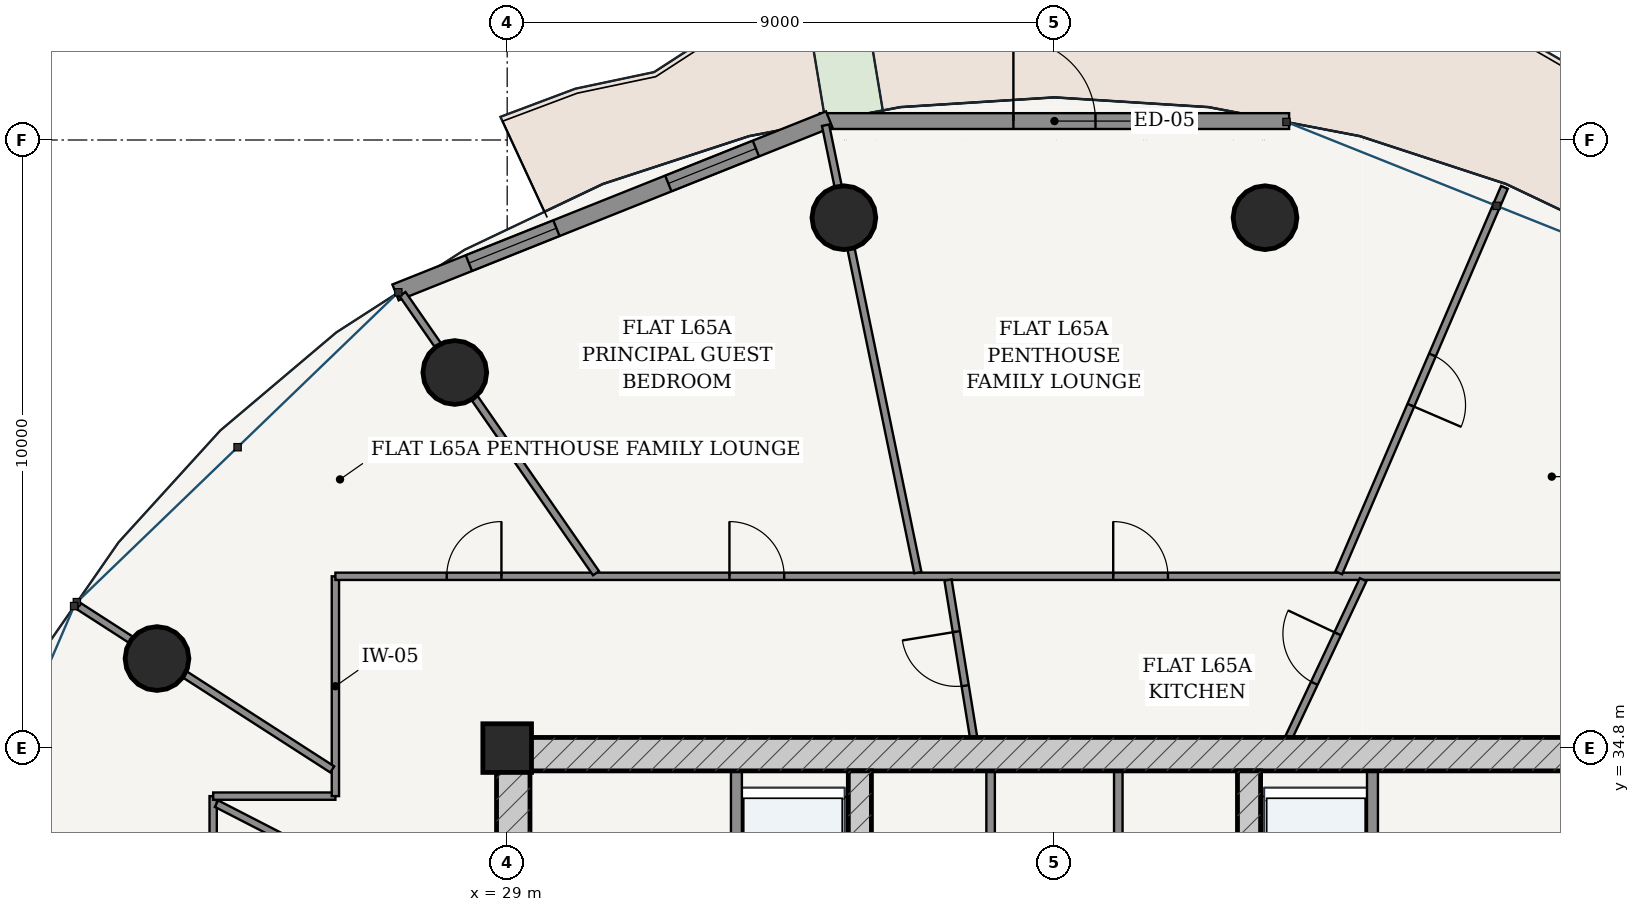
"""IFC4 building model, lengths in metres.
Left out: names, types, materials, properties, quantities, classifications, styles, units other than length and angle.
Written with IfcOpenShell. Run it as: python <this file> out.ifc"""

import sys

from ifc_helpers import new_model, si_unit, direction, frame, frame_2d, origin, origin_2d, place, context, subcontext, project, spatial, rectangle, hollow_circle, extrude, source, transform, mapped, element, fill, save


model = new_model("IFC4")
c1 = context("Model", 3, precision=1e-05, world=origin(), true_north=direction((-0.2419218956, 0.970295726276)))
c2 = subcontext(c1, "Body", "Model", "MODEL_VIEW")
j1 = project(units=[si_unit("LENGTHUNIT", "METRE"), si_unit("PLANEANGLEUNIT", "RADIAN")], contexts=[c1])
p1 = place(None, origin())
s1 = spatial("IfcSite", under=j1, at=p1, CompositionType="ELEMENT")
p2 = place(p1, origin())
s2 = spatial("IfcBuilding", under=s1, at=p2, CompositionType="ELEMENT")
p3 = place(p2, frame((0.0, 0.0, 248.2)))
s3 = spatial("IfcBuildingStorey", under=s2, at=p3, CompositionType="ELEMENT", Elevation=248.2)
p4 = place(p3, frame((29.0, 34.8, 0.0), z_axis=(0.0, 0.0, 1.0), x_axis=(1.0, 0.0, 0.0)))
e1 = element("IfcColumn", 1, at=p4, inside=s3, PredefinedType="COLUMN", context=c2, shape_type="SweptSolid", body=[
    extrude(rectangle(XDim=0.8, YDim=0.8, at=origin_2d()), origin(), (0.0, 0.0, 1.0), 3.75),
])
p5 = place(p3, frame((28.825, 34.7, 0.0), z_axis=(0.0, 0.0, 1.0), x_axis=(1.0, 0.0, 0.0)))
e2 = element("IfcWall", 2, at=p5, inside=s3, PredefinedType="SHEAR", context=c2, shape_type="SweptSolid", body=[
    extrude(rectangle(XDim=18.35, YDim=0.55, at=frame_2d((9.175, 0.0))), origin(), (0.0, 0.0, 1.0), 3.49),
])
p6 = place(p3, frame((29.1, 19.175, 0.0), z_axis=(0.0, 0.0, 1.0), x_axis=(0.0, 1.0, 0.0)))
e3 = element("IfcWall", 3, at=p6, inside=s3, PredefinedType="SHEAR", context=c2, shape_type="SweptSolid", body=[
    extrude(rectangle(XDim=15.25, YDim=0.55, at=frame_2d((7.625, 0.0))), origin(), (0.0, 0.0, 1.0), 3.49),
])
p7 = place(p6, frame((9.875, 0.0, 0.0)))
e4 = element("IfcOpeningElement", 4, at=p7, cuts=e3, PredefinedType="OPENING", context=c2, shape_type="SweptSolid", body=[
    extrude(rectangle(XDim=1.5, YDim=2.2, at=frame_2d((0.75, 1.1))), frame((0.0, 0.285, 0.0), z_axis=(0.0, -1.0, 0.0), x_axis=(1.0, 0.0, 0.0)), (0.0, 0.0, 1.0), 0.57),
])
p8 = place(p3, frame((34.8, 19.175, 0.0), z_axis=(0.0, 0.0, 1.0), x_axis=(0.0, 1.0, 0.0)))
e5 = element("IfcWall", 5, at=p8, inside=s3, PredefinedType="SHEAR", context=c2, shape_type="SweptSolid", body=[
    extrude(rectangle(XDim=15.25, YDim=0.38, at=frame_2d((7.625, 0.0))), origin(), (0.0, 0.0, 1.0), 3.49),
])
p9 = place(p8, frame((7.8, 0.0, 0.0)))
e6 = element("IfcOpeningElement", 6, at=p9, cuts=e5, PredefinedType="OPENING", context=c2, shape_type="SweptSolid", body=[
    extrude(rectangle(XDim=1.05, YDim=2.15, at=frame_2d((0.525, 1.075))), frame((0.0, 0.2, 0.0), z_axis=(0.0, -1.0, 0.0), x_axis=(1.0, 0.0, 0.0)), (0.0, 0.0, 1.0), 0.4),
])
p10 = place(p3, frame((41.2, 19.175, 0.0), z_axis=(0.0, 0.0, 1.0), x_axis=(0.0, 1.0, 0.0)))
e7 = element("IfcWall", 7, at=p10, inside=s3, PredefinedType="SHEAR", context=c2, shape_type="SweptSolid", body=[
    extrude(rectangle(XDim=15.25, YDim=0.38, at=frame_2d((7.625, 0.0))), origin(), (0.0, 0.0, 1.0), 3.49),
])
p11 = place(p10, frame((7.8, 0.0, 0.0)))
e8 = element("IfcOpeningElement", 8, at=p11, cuts=e7, PredefinedType="OPENING", context=c2, shape_type="SweptSolid", body=[
    extrude(rectangle(XDim=1.05, YDim=2.15, at=frame_2d((0.525, 1.075))), frame((0.0, 0.2, 0.0), z_axis=(0.0, -1.0, 0.0), x_axis=(1.0, 0.0, 0.0)), (0.0, 0.0, 1.0), 0.4),
])
for number, where, z_axis, x_axis in (
    (9, (41.463, 43.522, 0.0), (0.0, 0.0, 1.0), (1.0, 0.0, 0.0)),
    (10, (34.537, 43.522, 0.0), (0.0, 0.0, 1.0), (1.0, 0.0, 0.0)),
    (11, (28.139, 40.977, 0.0), (0.0, 0.0, 1.0), (1.0, 0.0, 0.0)),
    (12, (23.241, 36.272, 0.0), (0.0, 0.0, 1.0), (1.0, 0.0, 0.0)),
):
    element("IfcColumn", number, at=place(p3, frame(where, z_axis=z_axis, x_axis=x_axis)), inside=s3, PredefinedType="COLUMN", context=c2, shape_type="SweptSolid", body=[
        extrude(hollow_circle(Radius=0.525, WallThickness=0.035, at=origin_2d()), origin(), (0.0, 0.0, 1.0), 3.75),
    ])
p12 = place(p3, frame((41.859, 45.111, 0.0), z_axis=(0.0, 0.0, 1.0), x_axis=(-1.0, 0.0, 0.0)))
e13 = element("IfcWall", 13, at=p12, inside=s3, PredefinedType="SOLIDWALL", context=c2, shape_type="SweptSolid", body=[
    extrude(rectangle(XDim=7.718, YDim=0.26, at=frame_2d((3.859, 0.0))), origin(), (0.0, 0.0, 1.0), 3.49),
])
p13 = place(p12, frame((3.184, 0.0, 0.0)))
e14 = element("IfcOpeningElement", 14, at=p13, cuts=e13, PredefinedType="OPENING", context=c2, shape_type="SweptSolid", body=[
    extrude(rectangle(XDim=1.35, YDim=2.2, at=frame_2d((0.675, 1.1))), frame((0.0, 0.14, 0.0), z_axis=(0.0, -1.0, 0.0), x_axis=(1.0, 0.0, 0.0)), (0.0, 0.0, 1.0), 0.28),
])
p14 = place(p3, frame((34.295, 45.141, 0.0), z_axis=(0.0, 0.0, 1.0), x_axis=(-0.928724272392, -0.370771123296, 0.0)))
e15 = element("IfcWall", 15, at=p14, inside=s3, PredefinedType="SOLIDWALL", context=c2, shape_type="SweptSolid", body=[
    extrude(rectangle(XDim=7.678, YDim=0.28, at=frame_2d((3.839, 0.0))), origin(), (0.0, 0.0, 1.0), 3.49),
])
p15 = place(p14, frame((1.298, 0.0, 0.85)))
e16 = element("IfcOpeningElement", 16, at=p15, cuts=e15, PredefinedType="OPENING", context=c2, shape_type="SweptSolid", body=[
    extrude(rectangle(XDim=1.55, YDim=1.95, at=frame_2d((0.775, 0.975))), frame((0.0, 0.15, 0.0), z_axis=(0.0, -1.0, 0.0), x_axis=(1.0, 0.0, 0.0)), (0.0, 0.0, 1.0), 0.3),
])
p16 = place(p14, frame((4.83, 0.0, 0.85)))
e17 = element("IfcOpeningElement", 17, at=p16, cuts=e15, PredefinedType="OPENING", context=c2, shape_type="SweptSolid", body=[
    extrude(rectangle(XDim=1.55, YDim=1.95, at=frame_2d((0.775, 0.975))), frame((0.0, 0.15, 0.0), z_axis=(0.0, -1.0, 0.0), x_axis=(1.0, 0.0, 0.0)), (0.0, 0.0, 1.0), 0.3),
])
p17 = place(p3, frame((32.77, 28.52, 0.0), z_axis=(0.0, 0.0, 1.0), x_axis=(0.0, 1.0, 0.0)))
e18 = element("IfcWall", 18, at=p17, inside=s3, PredefinedType="PARTITIONING", context=c2, shape_type="SweptSolid", body=[
    extrude(rectangle(XDim=5.905, YDim=0.18, at=frame_2d((2.953, 0.0))), origin(), (0.0, 0.0, 1.0), 3.49),
])
p18 = place(p17, frame((3.655, 0.0, 0.0)))
e19 = element("IfcOpeningElement", 19, at=p18, cuts=e18, PredefinedType="OPENING", context=c2, shape_type="SweptSolid", body=[
    extrude(rectangle(XDim=1.15, YDim=2.2, at=frame_2d((0.575, 1.1))), frame((0.0, 0.1, 0.0), z_axis=(0.0, -1.0, 0.0), x_axis=(1.0, 0.0, 0.0)), (0.0, 0.0, 1.0), 0.2),
])
p19 = place(p17, frame((0.73, 0.0, 0.0)))
e20 = element("IfcOpeningElement", 20, at=p19, cuts=e18, PredefinedType="OPENING", context=c2, shape_type="SweptSolid", body=[
    extrude(rectangle(XDim=1.2, YDim=2.25, at=frame_2d((0.6, 1.125))), frame((0.0, 0.1, 0.0), z_axis=(0.0, -1.0, 0.0), x_axis=(1.0, 0.0, 0.0)), (0.0, 0.0, 1.0), 0.2),
])
p20 = place(p3, frame((43.23, 28.52, 0.0), z_axis=(0.0, 0.0, 1.0), x_axis=(0.0, 1.0, 0.0)))
e21 = element("IfcWall", 21, at=p20, inside=s3, PredefinedType="PARTITIONING", context=c2, shape_type="SweptSolid", body=[
    extrude(rectangle(XDim=5.905, YDim=0.18, at=frame_2d((2.953, 0.0))), origin(), (0.0, 0.0, 1.0), 3.49),
])
p21 = place(p20, frame((0.905, 0.0, 0.0)))
e22 = element("IfcOpeningElement", 22, at=p21, cuts=e21, PredefinedType="OPENING", context=c2, shape_type="SweptSolid", body=[
    extrude(rectangle(XDim=0.85, YDim=2.1, at=frame_2d((0.425, 1.05))), frame((0.0, 0.1, 0.0), z_axis=(0.0, -1.0, 0.0), x_axis=(1.0, 0.0, 0.0)), (0.0, 0.0, 1.0), 0.2),
])
p22 = place(p20, frame((3.655, 0.0, 0.0)))
e23 = element("IfcOpeningElement", 23, at=p22, cuts=e21, PredefinedType="OPENING", context=c2, shape_type="SweptSolid", body=[
    extrude(rectangle(XDim=1.15, YDim=2.2, at=frame_2d((0.575, 1.1))), frame((0.0, 0.1, 0.0), z_axis=(0.0, -1.0, 0.0), x_axis=(1.0, 0.0, 0.0)), (0.0, 0.0, 1.0), 0.2),
])
for number, where, z_axis, x_axis in (
    (24, (36.95, 28.56, 0.0), (0.0, 0.0, 1.0), (0.0, 1.0, 0.0)),
    (25, (39.05, 28.56, 0.0), (0.0, 0.0, 1.0), (0.0, 1.0, 0.0)),
):
    element("IfcWall", number, at=place(p3, frame(where, z_axis=z_axis, x_axis=x_axis)), inside=s3, PredefinedType="PARTITIONING", context=c2, shape_type="SweptSolid", body=[
        extrude(rectangle(XDim=5.865, YDim=0.14, at=frame_2d((2.933, 0.0))), origin(), (0.0, 0.0, 1.0), 3.49),
    ])
p23 = place(p3, frame((24.165, 24.249, 0.0), z_axis=(0.0, 0.0, 1.0), x_axis=(0.0, 1.0, 0.0)))
e26 = element("IfcWall", 26, at=p23, inside=s3, PredefinedType="PARTITIONING", context=c2, shape_type="SweptSolid", body=[
    extrude(rectangle(XDim=9.761, YDim=0.12, at=frame_2d((4.88, 0.0))), origin(), (0.0, 0.0, 1.0), 3.015),
])
p24 = place(p23, frame((4.43, 0.0, 0.0)))
e27 = element("IfcOpeningElement", 27, at=p24, cuts=e26, PredefinedType="OPENING", context=c2, shape_type="SweptSolid", body=[
    extrude(rectangle(XDim=0.9, YDim=2.15, at=frame_2d((0.45, 1.075))), frame((0.0, 0.07, 0.0), z_axis=(0.0, -1.0, 0.0), x_axis=(1.0, 0.0, 0.0)), (0.0, 0.0, 1.0), 0.14),
])
p25 = place(p3, frame((24.165, 34.01, 0.0), z_axis=(0.0, 0.0, 1.0), x_axis=(1.0, 0.0, 0.0)))
e28 = element("IfcWall", 28, at=p25, inside=s3, PredefinedType="PARTITIONING", context=c2, shape_type="SweptSolid", body=[
    extrude(rectangle(XDim=2.01, YDim=0.12, at=frame_2d((1.005, 0.0))), origin(), (0.0, 0.0, 1.0), 3.209),
])
p26 = place(p3, frame((26.175, 34.01, 0.0), z_axis=(0.0, 0.0, 1.0), x_axis=(0.0, 1.0, 0.0)))
e29 = element("IfcWall", 29, at=p26, inside=s3, PredefinedType="PARTITIONING", context=c2, shape_type="SweptSolid", body=[
    extrude(rectangle(XDim=3.615, YDim=0.12, at=frame_2d((1.808, 0.0))), origin(), (0.0, 0.0, 1.0), 3.015),
])
p27 = place(p3, frame((26.175, 37.625, 0.0), z_axis=(0.0, 0.0, 1.0), x_axis=(1.0, 0.0, 0.0)))
e30 = element("IfcWall", 30, at=p27, inside=s3, PredefinedType="PARTITIONING", context=c2, shape_type="SweptSolid", body=[
    extrude(rectangle(XDim=23.65, YDim=0.12, at=frame_2d((11.825, 0.0))), origin(), (0.0, 0.0, 1.0), 3.015),
])
p28 = place(p27, frame((12.791, 0.0, 0.0)))
e31 = element("IfcOpeningElement", 31, at=p28, cuts=e30, PredefinedType="OPENING", context=c2, shape_type="SweptSolid", body=[
    extrude(rectangle(XDim=0.9, YDim=2.15, at=frame_2d((0.45, 1.075))), frame((0.0, 0.07, 0.0), z_axis=(0.0, -1.0, 0.0), x_axis=(1.0, 0.0, 0.0)), (0.0, 0.0, 1.0), 0.14),
])
p29 = place(p27, frame((6.48, 0.0, 0.0)))
e32 = element("IfcOpeningElement", 32, at=p29, cuts=e30, PredefinedType="OPENING", context=c2, shape_type="SweptSolid", body=[
    extrude(rectangle(XDim=0.9, YDim=2.15, at=frame_2d((0.45, 1.075))), frame((0.0, 0.07, 0.0), z_axis=(0.0, -1.0, 0.0), x_axis=(1.0, 0.0, 0.0)), (0.0, 0.0, 1.0), 0.14),
])
p30 = place(p27, frame((1.831, 0.0, 0.0)))
e33 = element("IfcOpeningElement", 33, at=p30, cuts=e30, PredefinedType="OPENING", context=c2, shape_type="SweptSolid", body=[
    extrude(rectangle(XDim=0.9, YDim=2.15, at=frame_2d((0.45, 1.075))), frame((0.0, 0.07, 0.0), z_axis=(0.0, -1.0, 0.0), x_axis=(1.0, 0.0, 0.0)), (0.0, 0.0, 1.0), 0.14),
])
p31 = place(p3, frame((42.676, 37.682, 0.0), z_axis=(0.0, 0.0, 1.0), x_axis=(0.394777489933, 0.918776759307, 0.0)))
e34 = element("IfcWall", 34, at=p31, inside=s3, PredefinedType="PARTITIONING", context=c2, shape_type="SweptSolid", body=[
    extrude(rectangle(XDim=6.9, YDim=0.12, at=frame_2d((3.45, 0.0))), origin(), (0.0, 0.0, 1.0), 3.121),
])
p32 = place(p31, frame((3.0, 0.0, 0.0)))
e35 = element("IfcOpeningElement", 35, at=p32, cuts=e34, PredefinedType="OPENING", context=c2, shape_type="SweptSolid", body=[
    extrude(rectangle(XDim=0.9, YDim=2.15, at=frame_2d((0.45, 1.075))), frame((0.0, 0.07, 0.0), z_axis=(0.0, -1.0, 0.0), x_axis=(1.0, 0.0, 0.0)), (0.0, 0.0, 1.0), 0.14),
])
p33 = place(p3, frame((35.754, 37.686, 0.0), z_axis=(0.0, 0.0, 1.0), x_axis=(-0.202105877204, 0.979363678313, 0.0)))
e36 = element("IfcWall", 36, at=p33, inside=s3, PredefinedType="PARTITIONING", context=c2, shape_type="SweptSolid", body=[
    extrude(rectangle(XDim=7.512, YDim=0.12, at=frame_2d((3.756, 0.0))), origin(), (0.0, 0.0, 1.0), 3.015),
])
p34 = place(p3, frame((30.461, 37.676, 0.0), z_axis=(0.0, 0.0, 1.0), x_axis=(-0.569689482466, 0.821860020665, 0.0)))
e37 = element("IfcWall", 37, at=p34, inside=s3, PredefinedType="PARTITIONING", context=c2, shape_type="SweptSolid", body=[
    extrude(rectangle(XDim=5.585, YDim=0.12, at=frame_2d((2.792, 0.0))), origin(), (0.0, 0.0, 1.0), 3.015),
])
p35 = place(p3, frame((26.123, 34.45, 0.0), z_axis=(0.0, 0.0, 1.0), x_axis=(-0.840703033126, 0.541496454367, 0.0)))
e38 = element("IfcWall", 38, at=p35, inside=s3, PredefinedType="PARTITIONING", context=c2, shape_type="SweptSolid", body=[
    extrude(rectangle(XDim=4.958, YDim=0.12, at=frame_2d((2.479, 0.0))), origin(), (0.0, 0.0, 1.0), 3.015),
])
p36 = place(p3, frame((41.854, 34.977, 0.0), z_axis=(0.0, 0.0, 1.0), x_axis=(0.42640827804, 0.904530806783, 0.0)))
e39 = element("IfcWall", 39, at=p36, inside=s3, PredefinedType="PARTITIONING", context=c2, shape_type="SweptSolid", body=[
    extrude(rectangle(XDim=2.866, YDim=0.12, at=frame_2d((1.433, 0.0))), origin(), (0.0, 0.0, 1.0), 3.49),
])
p37 = place(p36, frame((0.983, 0.0, 0.0)))
e40 = element("IfcOpeningElement", 40, at=p37, cuts=e39, PredefinedType="OPENING", context=c2, shape_type="SweptSolid", body=[
    extrude(rectangle(XDim=0.9, YDim=2.15, at=frame_2d((0.45, 1.075))), frame((0.0, 0.07, 0.0), z_axis=(0.0, -1.0, 0.0), x_axis=(1.0, 0.0, 0.0)), (0.0, 0.0, 1.0), 0.14),
])
p38 = place(p3, frame((36.67, 34.977, 0.0), z_axis=(0.0, 0.0, 1.0), x_axis=(-0.160605953374, 0.98701860557, 0.0)))
e41 = element("IfcWall", 41, at=p38, inside=s3, PredefinedType="PARTITIONING", context=c2, shape_type="SweptSolid", body=[
    extrude(rectangle(XDim=2.621, YDim=0.12, at=frame_2d((1.31, 0.0))), origin(), (0.0, 0.0, 1.0), 2.575),
])
p39 = place(p38, frame((0.86, 0.0, 0.0)))
e42 = element("IfcOpeningElement", 42, at=p39, cuts=e41, PredefinedType="OPENING", context=c2, shape_type="SweptSolid", body=[
    extrude(rectangle(XDim=0.9, YDim=2.15, at=frame_2d((0.45, 1.075))), frame((0.0, 0.07, 0.0), z_axis=(0.0, -1.0, 0.0), x_axis=(1.0, 0.0, 0.0)), (0.0, 0.0, 1.0), 0.14),
])
p40 = place(p3, frame((28.825, 31.518, 0.0), z_axis=(0.0, 0.0, 1.0), x_axis=(-0.889305882583, 0.457312854842, 0.0)))
e43 = element("IfcWall", 43, at=p40, inside=s3, PredefinedType="PARTITIONING", context=c2, shape_type="SweptSolid", body=[
    extrude(rectangle(XDim=5.178, YDim=0.12, at=frame_2d((2.589, 0.0))), origin(), (0.0, 0.0, 1.0), 3.209),
])
p41 = place(p40, frame((2.139, 0.0, 0.0)))
e44 = element("IfcOpeningElement", 44, at=p41, cuts=e43, PredefinedType="OPENING", context=c2, shape_type="SweptSolid", body=[
    extrude(rectangle(XDim=0.9, YDim=2.15, at=frame_2d((0.45, 1.075))), frame((0.0, 0.07, 0.0), z_axis=(0.0, -1.0, 0.0), x_axis=(1.0, 0.0, 0.0)), (0.0, 0.0, 1.0), 0.14),
])
m1 = source(origin(), c2, "Body", "SweptSolid", [
    extrude(rectangle(XDim=1.35, YDim=2.2, at=frame_2d((0.675, 1.1))), frame((0.0, 0.025, 0.0), z_axis=(0.0, -1.0, 0.0), x_axis=(1.0, 0.0, 0.0)), (0.0, 0.0, 1.0), 0.05),
])
p42 = place(p13, frame((1.35, 0.0, 0.0), z_axis=(0.0, 0.0, 1.0), x_axis=(-1.0, 0.0, 0.0)))
e45 = element("IfcDoor", 45, at=p42, inside=s3, OperationType="SINGLE_SWING_LEFT", PredefinedType="DOOR", context=c2, shape_type="MappedRepresentation", body=[
    mapped(m1, transform((0.0, 0.0, 0.0), scale=1.0)),
])
fill(e14, e45)
m2 = source(origin(), c2, "Body", "SweptSolid", [
    extrude(rectangle(XDim=1.55, YDim=1.95, at=frame_2d((0.775, 0.975))), frame((0.0, 0.03, 0.0), z_axis=(0.0, -1.0, 0.0), x_axis=(1.0, 0.0, 0.0)), (0.0, 0.0, 1.0), 0.06),
])
p43 = place(p15, origin())
e46 = element("IfcWindow", 46, at=p43, inside=s3, PartitioningType="SINGLE_PANEL", PredefinedType="WINDOW", context=c2, shape_type="MappedRepresentation", body=[
    mapped(m2, transform((0.0, 0.0, 0.0), scale=1.0)),
])
fill(e16, e46)
p44 = place(p16, origin())
e47 = element("IfcWindow", 47, at=p44, inside=s3, PartitioningType="SINGLE_PANEL", PredefinedType="WINDOW", context=c2, shape_type="MappedRepresentation", body=[
    mapped(m2, transform((0.0, 0.0, 0.0), scale=1.0)),
])
fill(e17, e47)
m3 = source(origin(), c2, "Body", "SweptSolid", [
    extrude(rectangle(XDim=0.9, YDim=2.15, at=frame_2d((0.45, 1.075))), frame((0.0, 0.025, 0.0), z_axis=(0.0, -1.0, 0.0), x_axis=(1.0, 0.0, 0.0)), (0.0, 0.0, 1.0), 0.05),
])
p45 = place(p37, origin())
e48 = element("IfcDoor", 48, at=p45, inside=s3, OperationType="SINGLE_SWING_RIGHT", PredefinedType="DOOR", context=c2, shape_type="MappedRepresentation", body=[
    mapped(m3, transform((0.0, 0.0, 0.0), scale=1.0)),
])
fill(e40, e48)
p46 = place(p28, origin())
e49 = element("IfcDoor", 49, at=p46, inside=s3, OperationType="SINGLE_SWING_LEFT", PredefinedType="DOOR", context=c2, shape_type="MappedRepresentation", body=[
    mapped(m3, transform((0.0, 0.0, 0.0), scale=1.0)),
])
fill(e31, e49)
p47 = place(p39, origin())
e50 = element("IfcDoor", 50, at=p47, inside=s3, OperationType="SINGLE_SWING_RIGHT", PredefinedType="DOOR", context=c2, shape_type="MappedRepresentation", body=[
    mapped(m3, transform((0.0, 0.0, 0.0), scale=1.0)),
])
fill(e42, e50)
p48 = place(p32, frame((0.9, 0.0, 0.0), z_axis=(0.0, 0.0, 1.0), x_axis=(-1.0, 0.0, 0.0)))
e51 = element("IfcDoor", 51, at=p48, inside=s3, OperationType="SINGLE_SWING_RIGHT", PredefinedType="DOOR", context=c2, shape_type="MappedRepresentation", body=[
    mapped(m3, transform((0.0, 0.0, 0.0), scale=1.0)),
])
fill(e35, e51)
p49 = place(p29, origin())
e52 = element("IfcDoor", 52, at=p49, inside=s3, OperationType="SINGLE_SWING_LEFT", PredefinedType="DOOR", context=c2, shape_type="MappedRepresentation", body=[
    mapped(m3, transform((0.0, 0.0, 0.0), scale=1.0)),
])
fill(e32, e52)
p50 = place(p30, origin())
e53 = element("IfcDoor", 53, at=p50, inside=s3, OperationType="SINGLE_SWING_RIGHT", PredefinedType="DOOR", context=c2, shape_type="MappedRepresentation", body=[
    mapped(m3, transform((0.0, 0.0, 0.0), scale=1.0)),
])
fill(e33, e53)
save(model, sys.argv[1])
